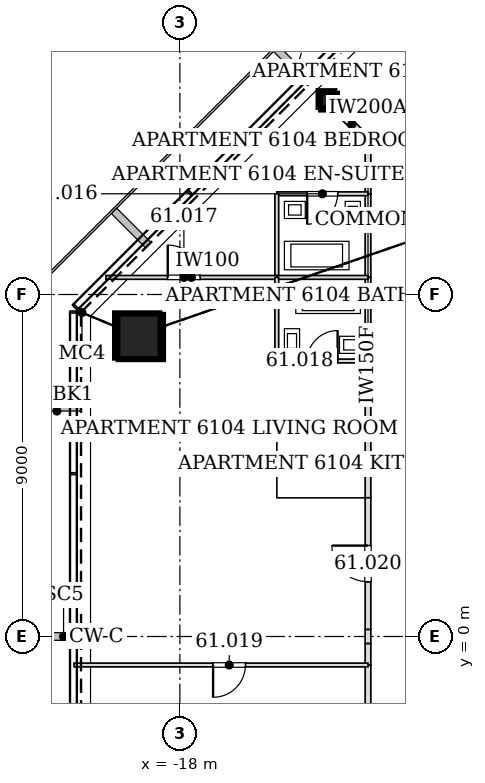
"""IFC4 building model, lengths in metres.
Left out: names, types, materials, properties, quantities, classifications, styles, units other than length and angle.
Written with IfcOpenShell. Run it as: python <this file> out.ifc"""

import sys

from ifc_helpers import new_model, si_unit, direction, frame, frame_2d, origin, origin_2d, place, context, subcontext, project, spatial, rectangle, hollow_rectangle, extrude, element, fill, save


model = new_model("IFC4")
c1 = context("Model", 3, precision=1e-05, world=origin(), true_north=direction((0.0, 1.0)))
c2 = subcontext(c1, "Body", "Model", "MODEL_VIEW")
j1 = project(units=[si_unit("LENGTHUNIT", "METRE"), si_unit("PLANEANGLEUNIT", "RADIAN")], contexts=[c1])
p1 = place(None, origin())
s1 = spatial("IfcSite", under=j1, at=p1, CompositionType="ELEMENT")
p2 = place(p1, origin())
s2 = spatial("IfcBuilding", under=s1, at=p2, CompositionType="ELEMENT")
p3 = place(p2, frame((0.0, 0.0, 255.0)))
s3 = spatial("IfcBuildingStorey", under=s2, at=p3, CompositionType="ELEMENT", Elevation=255.0)
p4 = place(p3, frame((-19.123, 7.921, 0.0), z_axis=(0.028207433197, -0.011699266186, 0.999533625189), x_axis=(0.383112853862, 0.92370154336, 0.0)))
e1 = element("IfcColumn", 1, at=p4, inside=s3, PredefinedType="COLUMN", context=c2, shape_type="SweptSolid", body=[
    extrude(hollow_rectangle(XDim=1.2, YDim=1.2, WallThickness=0.055, at=origin_2d()), origin(), (0.0, 0.0, 1.0), 3.401),
])
for number, where, z_axis, x_axis in (
    (2, (-14.143, 14.143, 0.0), (0.02, -0.02, 1.0), (0.707, 0.707, 0.0)),
    (3, (-20.001, 0.0, 0.0), (0.028, 0.0, 1.0), (0.0, 1.0, 0.0)),
):
    element("IfcColumn", number, at=place(p3, frame(where, z_axis=z_axis, x_axis=x_axis)), inside=s3, PredefinedType="COLUMN", context=c2, shape_type="SweptSolid", body=[
        extrude(hollow_rectangle(XDim=0.45, YDim=0.45, WallThickness=0.02, at=origin_2d()), origin(), (0.0, 0.0, 1.0), 3.401),
    ])
p5 = place(p3, frame((-11.649, 13.05, 0.0), z_axis=(0.0, 0.0, 1.0), x_axis=(-1.0, 0.0, 0.0)))
e4 = element("IfcWall", 4, at=p5, inside=s3, PredefinedType="PARTITIONING", context=c2, shape_type="SweptSolid", body=[
    extrude(rectangle(XDim=1.401, YDim=0.15, at=frame_2d((0.701, 0.0))), origin(), (0.0, 0.0, 1.0), 2.656),
])
p6 = place(p3, frame((-13.05, 11.651, 0.0), z_axis=(0.0, 0.0, 1.0), x_axis=(0.0, -1.0, 0.0)))
e5 = element("IfcWall", 5, at=p6, inside=s3, PredefinedType="PARTITIONING", context=c2, shape_type="SweptSolid", body=[
    extrude(rectangle(XDim=2.202, YDim=0.15, at=frame_2d((1.101, 0.0))), origin(), (0.0, 0.0, 1.0), 2.349),
])
p7 = place(p3, frame((-13.05, 13.05, 0.0), z_axis=(0.0, 0.0, 1.0), x_axis=(0.0, -1.0, 0.0)))
e6 = element("IfcWall", 6, at=p7, inside=s3, PredefinedType="PARTITIONING", context=c2, shape_type="SweptSolid", body=[
    extrude(rectangle(XDim=1.401, YDim=0.15, at=frame_2d((0.701, 0.0))), origin(), (0.0, 0.0, 1.0), 2.656),
])
p8 = place(p3, frame((-13.05, 9.451, 0.0), z_axis=(0.0, 0.0, 1.0), x_axis=(0.0, -1.0, 0.0)))
e7 = element("IfcWall", 7, at=p8, inside=s3, PredefinedType="PARTITIONING", context=c2, shape_type="SweptSolid", body=[
    extrude(rectangle(XDim=2.202, YDim=0.15, at=frame_2d((1.101, 0.0))), origin(), (0.0, 0.0, 1.0), 2.662),
])
p9 = place(p3, frame((-13.05, 5.451, 0.0), z_axis=(0.0, 0.0, 1.0), x_axis=(0.0, -1.0, 0.0)))
e8 = element("IfcWall", 8, at=p9, inside=s3, PredefinedType="PARTITIONING", context=c2, shape_type="SweptSolid", body=[
    extrude(rectangle(XDim=1.802, YDim=0.15, at=frame_2d((0.901, 0.0))), origin(), (0.0, 0.0, 1.0), 2.662),
])
p10 = place(p3, frame((-13.05, -0.749, 0.0), z_axis=(0.0, 0.0, 1.0), x_axis=(0.0, -1.0, 0.0)))
e9 = element("IfcWall", 9, at=p10, inside=s3, PredefinedType="PARTITIONING", context=c2, shape_type="SweptSolid", body=[
    extrude(rectangle(XDim=3.702, YDim=0.15, at=frame_2d((1.851, 0.0))), origin(), (0.0, 0.0, 1.0), 2.662),
])
p11 = place(p3, frame((-13.05, 3.651, 0.0), z_axis=(0.0, 0.0, 1.0), x_axis=(0.0, -1.0, 0.0)))
e10 = element("IfcWall", 10, at=p11, inside=s3, PredefinedType="PARTITIONING", context=c2, shape_type="SweptSolid", body=[
    extrude(rectangle(XDim=3.469, YDim=0.15, at=frame_2d((1.734, 0.0))), origin(), (0.0, 0.0, 1.0), 2.662),
])
p12 = place(p11, frame((1.259, 0.0, 0.0)))
e11 = element("IfcOpeningElement", 11, at=p12, cuts=e10, PredefinedType="OPENING", context=c2, shape_type="SweptSolid", body=[
    extrude(rectangle(XDim=0.95, YDim=2.1, at=frame_2d((0.475, 1.05))), frame((0.0, 0.085, 0.0), z_axis=(0.0, -1.0, 0.0), x_axis=(1.0, 0.0, 0.0)), (0.0, 0.0, 1.0), 0.17),
])
p13 = place(p3, frame((-13.05, -0.182, 0.0), z_axis=(0.0, 0.0, 1.0), x_axis=(0.0, -1.0, 0.0)))
e12 = element("IfcWall", 12, at=p13, inside=s3, PredefinedType="PARTITIONING", context=c2, shape_type="SweptSolid", body=[
    extrude(rectangle(XDim=0.569, YDim=0.15, at=frame_2d((0.284, 0.0))), origin(), (0.0, 0.0, 1.0), 2.662),
])
p14 = place(p3, frame((-13.05, 0.182, 0.0), z_axis=(0.0, 0.0, 1.0), x_axis=(0.0, -1.0, 0.0)))
e13 = element("IfcWall", 13, at=p14, inside=s3, PredefinedType="PARTITIONING", context=c2, shape_type="SweptSolid", body=[
    extrude(rectangle(XDim=0.365, YDim=0.15, at=frame_2d((0.182, 0.0))), origin(), (0.0, 0.0, 1.0), 2.268),
])
p15 = place(p3, frame((-13.05, 7.251, 0.0), z_axis=(0.0, 0.0, 1.0), x_axis=(0.0, -1.0, 0.0)))
e14 = element("IfcWall", 14, at=p15, inside=s3, PredefinedType="PARTITIONING", context=c2, shape_type="SweptSolid", body=[
    extrude(rectangle(XDim=1.802, YDim=0.15, at=frame_2d((0.901, 0.0))), origin(), (0.0, 0.0, 1.0), 2.662),
])
p16 = place(p3, frame((-13.902, 13.902, 0.0), z_axis=(0.0, 0.0, 1.0), x_axis=(0.707106781187, -0.707106781187, 0.0)))
e15 = element("IfcWall", 15, at=p16, inside=s3, PredefinedType="PARTITIONING", context=c2, shape_type="SweptSolid", body=[
    extrude(rectangle(XDim=1.205, YDim=0.2, at=frame_2d((0.603, 0.0))), origin(), (0.0, 0.0, 1.0), 2.656),
])
p17 = place(p3, frame((-13.05, 11.65, 0.0), z_axis=(0.0, 0.0, 1.0), x_axis=(-1.0, 0.0, 0.0)))
e16 = element("IfcWall", 16, at=p17, inside=s3, PredefinedType="PARTITIONING", context=c2, shape_type="SweptSolid", body=[
    extrude(rectangle(XDim=2.4, YDim=0.1, at=frame_2d((1.2, 0.0))), origin(), (0.0, 0.0, 1.0), 2.786),
])
p18 = place(p17, frame((0.8, 0.0, 0.0)))
e17 = element("IfcOpeningElement", 17, at=p18, cuts=e16, PredefinedType="OPENING", context=c2, shape_type="SweptSolid", body=[
    extrude(rectangle(XDim=0.8, YDim=2.1, at=frame_2d((0.4, 1.05))), frame((0.0, 0.06, 0.0), z_axis=(0.0, -1.0, 0.0), x_axis=(1.0, 0.0, 0.0)), (0.0, 0.0, 1.0), 0.12),
])
p19 = place(p3, frame((-15.45, 11.65, 0.0), z_axis=(0.0, 0.0, 1.0), x_axis=(0.0, -1.0, 0.0)))
e18 = element("IfcWall", 18, at=p19, inside=s3, PredefinedType="PARTITIONING", context=c2, shape_type="SweptSolid", body=[
    extrude(rectangle(XDim=2.2, YDim=0.1, at=frame_2d((1.1, 0.0))), origin(), (0.0, 0.0, 1.0), 2.786),
])
p20 = place(p3, frame((-15.45, 9.45, 0.0), z_axis=(0.0, 0.0, 1.0), x_axis=(1.0, 0.0, 0.0)))
e19 = element("IfcWall", 19, at=p20, inside=s3, PredefinedType="PARTITIONING", context=c2, shape_type="SweptSolid", body=[
    extrude(rectangle(XDim=2.4, YDim=0.1, at=frame_2d((1.2, 0.0))), origin(), (0.0, 0.0, 1.0), 2.349),
])
p21 = place(p3, frame((-19.945, 9.45, 0.0), z_axis=(0.0, 0.0, 1.0), x_axis=(1.0, 0.0, 0.0)))
e20 = element("IfcWall", 20, at=p21, inside=s3, PredefinedType="PARTITIONING", context=c2, shape_type="SweptSolid", body=[
    extrude(rectangle(XDim=4.495, YDim=0.1, at=frame_2d((2.248, 0.0))), origin(), (0.0, 0.0, 1.0), 2.74),
])
p22 = place(p21, frame((1.626, 0.0, 0.0)))
e21 = element("IfcOpeningElement", 21, at=p22, cuts=e20, PredefinedType="OPENING", context=c2, shape_type="SweptSolid", body=[
    extrude(rectangle(XDim=0.85, YDim=2.1, at=frame_2d((0.425, 1.05))), frame((0.0, 0.06, 0.0), z_axis=(0.0, -1.0, 0.0), x_axis=(1.0, 0.0, 0.0)), (0.0, 0.0, 1.0), 0.12),
])
p23 = place(p3, frame((-15.45, 9.45, 0.0), z_axis=(0.0, 0.0, 1.0), x_axis=(0.0, -1.0, 0.0)))
e22 = element("IfcWall", 22, at=p23, inside=s3, PredefinedType="PARTITIONING", context=c2, shape_type="SweptSolid", body=[
    extrude(rectangle(XDim=2.2, YDim=0.1, at=frame_2d((1.1, 0.0))), origin(), (0.0, 0.0, 1.0), 2.349),
])
p24 = place(p3, frame((-15.45, 7.25, 0.0), z_axis=(0.0, 0.0, 1.0), x_axis=(1.0, 0.0, 0.0)))
e23 = element("IfcWall", 23, at=p24, inside=s3, PredefinedType="PARTITIONING", context=c2, shape_type="SweptSolid", body=[
    extrude(rectangle(XDim=2.4, YDim=0.1, at=frame_2d((1.2, 0.0))), origin(), (0.0, 0.0, 1.0), 2.662),
])
p25 = place(p24, frame((0.8, 0.0, 0.0)))
e24 = element("IfcOpeningElement", 24, at=p25, cuts=e23, PredefinedType="OPENING", context=c2, shape_type="SweptSolid", body=[
    extrude(rectangle(XDim=0.8, YDim=2.1, at=frame_2d((0.4, 1.05))), frame((0.0, 0.06, 0.0), z_axis=(0.0, -1.0, 0.0), x_axis=(1.0, 0.0, 0.0)), (0.0, 0.0, 1.0), 0.12),
])
p26 = place(p3, frame((-13.05, -0.75, 0.0), z_axis=(0.0, 0.0, 1.0), x_axis=(-1.0, 0.0, 0.0)))
e25 = element("IfcWall", 25, at=p26, inside=s3, PredefinedType="PARTITIONING", context=c2, shape_type="SweptSolid", body=[
    extrude(rectangle(XDim=7.735, YDim=0.1, at=frame_2d((3.868, 0.0))), origin(), (0.0, 0.0, 1.0), 2.662),
])
p27 = place(p26, frame((3.226, 0.0, 0.0)))
e26 = element("IfcOpeningElement", 26, at=p27, cuts=e25, PredefinedType="OPENING", context=c2, shape_type="SweptSolid", body=[
    extrude(rectangle(XDim=0.85, YDim=2.1, at=frame_2d((0.425, 1.05))), frame((0.0, 0.06, 0.0), z_axis=(0.0, -1.0, 0.0), x_axis=(1.0, 0.0, 0.0)), (0.0, 0.0, 1.0), 0.12),
])
p28 = place(p18, origin())
e27 = element("IfcDoor", 27, at=p28, inside=s3, OperationType="SINGLE_SWING_RIGHT", PredefinedType="DOOR", context=c2, shape_type="SweptSolid", body=[
    extrude(rectangle(XDim=0.8, YDim=2.1, at=frame_2d((0.4, 1.05))), frame((0.0, 0.025, 0.0), z_axis=(0.0, -1.0, 0.0), x_axis=(1.0, 0.0, 0.0)), (0.0, 0.0, 1.0), 0.05),
])
fill(e17, e27)
p29 = place(p22, origin())
e28 = element("IfcDoor", 28, at=p29, inside=s3, OperationType="SINGLE_SWING_LEFT", PredefinedType="DOOR", context=c2, shape_type="SweptSolid", body=[
    extrude(rectangle(XDim=0.85, YDim=2.1, at=frame_2d((0.425, 1.05))), frame((0.0, 0.025, 0.0), z_axis=(0.0, -1.0, 0.0), x_axis=(1.0, 0.0, 0.0)), (0.0, 0.0, 1.0), 0.05),
])
fill(e21, e28)
p30 = place(p25, origin())
e29 = element("IfcDoor", 29, at=p30, inside=s3, OperationType="SINGLE_SWING_RIGHT", PredefinedType="DOOR", context=c2, shape_type="SweptSolid", body=[
    extrude(rectangle(XDim=0.8, YDim=2.1, at=frame_2d((0.4, 1.05))), frame((0.0, 0.025, 0.0), z_axis=(0.0, -1.0, 0.0), x_axis=(1.0, 0.0, 0.0)), (0.0, 0.0, 1.0), 0.05),
])
fill(e24, e29)
p31 = place(p27, origin())
e30 = element("IfcDoor", 30, at=p31, inside=s3, OperationType="SINGLE_SWING_RIGHT", PredefinedType="DOOR", context=c2, shape_type="SweptSolid", body=[
    extrude(rectangle(XDim=0.85, YDim=2.1, at=frame_2d((0.425, 1.05))), frame((0.0, 0.025, 0.0), z_axis=(0.0, -1.0, 0.0), x_axis=(1.0, 0.0, 0.0)), (0.0, 0.0, 1.0), 0.05),
])
fill(e26, e30)
p32 = place(p12, frame((0.95, 0.0, 0.0), z_axis=(0.0, 0.0, 1.0), x_axis=(-1.0, 0.0, 0.0)))
e31 = element("IfcDoor", 31, at=p32, inside=s3, OperationType="SINGLE_SWING_RIGHT", PredefinedType="DOOR", context=c2, shape_type="SweptSolid", body=[
    extrude(rectangle(XDim=0.95, YDim=2.1, at=frame_2d((0.475, 1.05))), frame((0.0, 0.025, 0.0), z_axis=(0.0, -1.0, 0.0), x_axis=(1.0, 0.0, 0.0)), (0.0, 0.0, 1.0), 0.05),
])
fill(e11, e31)
save(model, sys.argv[1])
